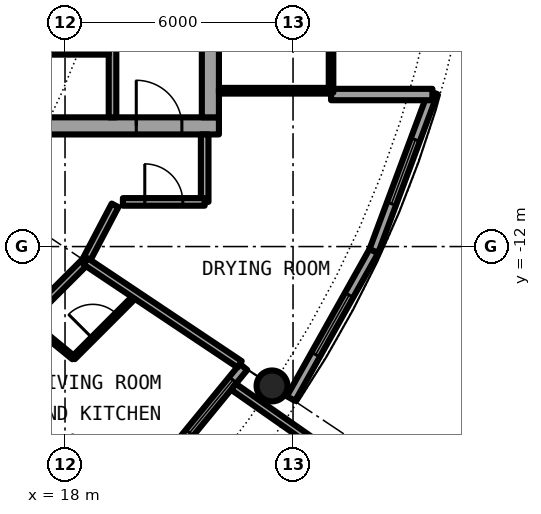
"""IFC4 building model, lengths in metres.
Left out: names, types, materials, properties, quantities, classifications, styles, units other than length and angle.
Written with IfcOpenShell. Run it as: python <this file> out.ifc"""

import sys

from ifc_helpers import new_model, si_unit, direction, frame, frame_2d, origin, origin_2d, place, context, subcontext, project, spatial, rectangle, hollow_circle, extrude, element, fill, save


model = new_model("IFC4")
c1 = context("Model", 3, precision=1e-05, world=origin(), true_north=direction((0.0, 1.0)))
c2 = subcontext(c1, "Body", "Model", "MODEL_VIEW")
j1 = project(units=[si_unit("LENGTHUNIT", "METRE"), si_unit("PLANEANGLEUNIT", "RADIAN")], contexts=[c1])
p1 = place(None, origin())
s1 = spatial("IfcSite", under=j1, at=p1, CompositionType="ELEMENT")
p2 = place(p1, origin())
s2 = spatial("IfcBuilding", under=s1, at=p2, CompositionType="ELEMENT")
p3 = place(p2, frame((0.0, 0.0, 218.8)))
s3 = spatial("IfcBuildingStorey", under=s2, at=p3, CompositionType="ELEMENT", Elevation=218.8)
p4 = place(p3, frame((23.448, -15.667, 0.0), z_axis=(0.0, 0.0, 1.0), x_axis=(1.0, 0.0, 0.0)))
e1 = element("IfcColumn", 1, at=p4, inside=s3, PredefinedType="COLUMN", context=c2, shape_type="SweptSolid", body=[
    extrude(hollow_circle(Radius=0.406, WallThickness=0.03, at=origin_2d()), origin(), (0.0, 0.0, 1.0), 3.05),
])
p5 = place(p3, frame((19.304, -19.304, 0.0), z_axis=(0.0, 0.0, 1.0), x_axis=(0.634382322723, 0.773019449054, 0.0)))
e2 = element("IfcWall", 2, at=p5, inside=s3, PredefinedType="SOLIDWALL", context=c2, shape_type="SweptSolid", body=[
    extrude(rectangle(XDim=5.352, YDim=0.25, at=frame_2d((2.676, 0.0))), origin(), (0.0, 0.0, 1.0), 2.65),
])
p6 = place(p5, frame((0.841, 0.0, 0.0)))
e3 = element("IfcOpeningElement", 3, at=p6, cuts=e2, PredefinedType="OPENING", context=c2, shape_type="SweptSolid", body=[
    extrude(rectangle(XDim=1.0, YDim=2.2, at=frame_2d((0.5, 1.1))), frame((0.0, 0.135, 0.0), z_axis=(0.0, -1.0, 0.0), x_axis=(1.0, 0.0, 0.0)), (0.0, 0.0, 1.0), 0.27),
])
p7 = place(p5, frame((3.111, 0.0, 0.3)))
e4 = element("IfcOpeningElement", 4, at=p7, cuts=e2, PredefinedType="OPENING", context=c2, shape_type="SweptSolid", body=[
    extrude(rectangle(XDim=1.8, YDim=2.1, at=frame_2d((0.9, 1.05))), frame((0.0, 0.135, 0.0), z_axis=(0.0, -1.0, 0.0), x_axis=(1.0, 0.0, 0.0)), (0.0, 0.0, 1.0), 0.27),
])
p8 = place(p3, frame((22.433, -15.688, -0.03), z_axis=(0.0, 0.0, 1.0), x_axis=(0.819373043115, -0.573260687834, 0.0)))
e5 = element("IfcWall", 5, at=p8, inside=s3, PredefinedType="SOLIDWALL", context=c2, shape_type="SweptSolid", body=[
    extrude(rectangle(XDim=2.925, YDim=0.2, at=frame_2d((1.463, 0.0))), origin(), (0.0, 0.0, 1.0), 2.68),
])
p9 = place(p3, frame((23.946, -16.0, 0.0), z_axis=(0.0, 0.0, 1.0), x_axis=(0.489696356642, 0.871893042919, 0.0)))
e6 = element("IfcWall", 6, at=p9, inside=s3, PredefinedType="SOLIDWALL", context=c2, shape_type="SweptSolid", body=[
    extrude(rectangle(XDim=4.454, YDim=0.25, at=frame_2d((2.227, 0.0))), origin(), (0.0, 0.0, 1.0), 2.65),
])
p10 = place(p9, frame((1.327, 0.0, 0.3)))
e7 = element("IfcOpeningElement", 7, at=p10, cuts=e6, PredefinedType="OPENING", context=c2, shape_type="SweptSolid", body=[
    extrude(rectangle(XDim=1.8, YDim=2.1, at=frame_2d((0.9, 1.05))), frame((0.0, 0.135, 0.0), z_axis=(0.0, -1.0, 0.0), x_axis=(1.0, 0.0, 0.0)), (0.0, 0.0, 1.0), 0.27),
])
p11 = place(p3, frame((26.127, -12.117, 0.0), z_axis=(0.0, 0.0, 1.0), x_axis=(0.349247811493, 0.937030397675, 0.0)))
e8 = element("IfcWall", 8, at=p11, inside=s3, PredefinedType="SOLIDWALL", context=c2, shape_type="SweptSolid", body=[
    extrude(rectangle(XDim=4.452, YDim=0.25, at=frame_2d((2.226, 0.0))), origin(), (0.0, 0.0, 1.0), 2.65),
])
p12 = place(p11, frame((1.327, 0.0, 0.3)))
e9 = element("IfcOpeningElement", 9, at=p12, cuts=e8, PredefinedType="OPENING", context=c2, shape_type="SweptSolid", body=[
    extrude(rectangle(XDim=1.8, YDim=2.1, at=frame_2d((0.9, 1.05))), frame((0.0, 0.135, 0.0), z_axis=(0.0, -1.0, 0.0), x_axis=(1.0, 0.0, 0.0)), (0.0, 0.0, 1.0), 0.27),
])
p13 = place(p3, frame((25.0, -8.0, 0.0), z_axis=(0.0, 0.0, 1.0), x_axis=(1.0, 0.0, 0.0)))
e10 = element("IfcWall", 10, at=p13, inside=s3, PredefinedType="SOLIDWALL", context=c2, shape_type="SweptSolid", body=[
    extrude(rectangle(XDim=2.667, YDim=0.3, at=frame_2d((1.333, 0.0))), origin(), (0.0, 0.0, 1.0), 2.65),
])
p14 = place(p3, frame((8.55, -8.825, 0.0), z_axis=(0.0, 0.0, 1.0), x_axis=(1.0, 0.0, 0.0)))
e11 = element("IfcWall", 11, at=p14, inside=s3, PredefinedType="SHEAR", context=c2, shape_type="SweptSolid", body=[
    extrude(rectangle(XDim=13.5, YDim=0.45, at=frame_2d((6.75, 0.0))), origin(), (0.0, 0.0, 1.0), 3.05),
])
p15 = place(p14, frame((11.325, 0.0, 0.0)))
e12 = element("IfcOpeningElement", 12, at=p15, cuts=e11, PredefinedType="OPENING", context=c2, shape_type="SweptSolid", body=[
    extrude(rectangle(XDim=1.2, YDim=2.3, at=frame_2d((0.6, 1.15))), frame((0.0, 0.235, 0.0), z_axis=(0.0, -1.0, 0.0), x_axis=(1.0, 0.0, 0.0)), (0.0, 0.0, 1.0), 0.47),
])
p16 = place(p3, frame((21.825, 8.6, 0.0), z_axis=(0.0, 0.0, 1.0), x_axis=(0.0, -1.0, 0.0)))
e13 = element("IfcWall", 13, at=p16, inside=s3, PredefinedType="SHEAR", context=c2, shape_type="SweptSolid", body=[
    extrude(rectangle(XDim=17.2, YDim=0.45, at=frame_2d((8.6, 0.0))), origin(), (0.0, 0.0, 1.0), 3.05),
])
p17 = place(p16, frame((7.7, 0.0, 0.0)))
e14 = element("IfcOpeningElement", 14, at=p17, cuts=e13, PredefinedType="OPENING", context=c2, shape_type="SweptSolid", body=[
    extrude(rectangle(XDim=1.8, YDim=2.3, at=frame_2d((0.9, 1.15))), frame((0.0, 0.235, 0.0), z_axis=(0.0, -1.0, 0.0), x_axis=(1.0, 0.0, 0.0)), (0.0, 0.0, 1.0), 0.47),
])
p18 = place(p3, frame((19.25, -8.6, 0.0), z_axis=(0.0, 0.0, 1.0), x_axis=(0.0, 1.0, 0.0)))
e15 = element("IfcWall", 15, at=p18, inside=s3, PredefinedType="SOLIDWALL", context=c2, shape_type="SweptSolid", body=[
    extrude(rectangle(XDim=7.025, YDim=0.2, at=frame_2d((3.513, 0.0))), origin(), (0.0, 0.0, 1.0), 2.65),
])
p19 = place(p18, frame((2.35, 0.0, 0.0)))
e16 = element("IfcOpeningElement", 16, at=p19, cuts=e15, PredefinedType="OPENING", context=c2, shape_type="SweptSolid", body=[
    extrude(rectangle(XDim=1.1, YDim=2.3, at=frame_2d((0.55, 1.15))), frame((0.0, 0.11, 0.0), z_axis=(0.0, -1.0, 0.0), x_axis=(1.0, 0.0, 0.0)), (0.0, 0.0, 1.0), 0.22),
])
p20 = place(p3, frame((15.45, -6.875, 0.0), z_axis=(0.0, 0.0, 1.0), x_axis=(1.0, 0.0, 0.0)))
e17 = element("IfcWall", 17, at=p20, inside=s3, PredefinedType="PARTITIONING", context=c2, shape_type="SweptSolid", body=[
    extrude(rectangle(XDim=3.7, YDim=0.15, at=frame_2d((1.85, 0.0))), origin(), (0.0, 0.0, 1.0), 2.65),
])
p21 = place(p20, frame((1.4, 0.0, 0.0)))
e18 = element("IfcOpeningElement", 18, at=p21, cuts=e17, PredefinedType="OPENING", context=c2, shape_type="SweptSolid", body=[
    extrude(rectangle(XDim=0.9, YDim=2.3, at=frame_2d((0.45, 1.15))), frame((0.0, 0.085, 0.0), z_axis=(0.0, -1.0, 0.0), x_axis=(1.0, 0.0, 0.0)), (0.0, 0.0, 1.0), 0.17),
])
p22 = place(p3, frame((22.05, -7.9, 0.0), z_axis=(0.0, 0.0, 1.0), x_axis=(1.0, 0.0, 0.0)))
e19 = element("IfcWall", 19, at=p22, inside=s3, PredefinedType="PARTITIONING", context=c2, shape_type="SweptSolid", body=[
    extrude(rectangle(XDim=2.89, YDim=0.15, at=frame_2d((1.445, 0.0))), origin(), (0.0, 0.0, 1.0), 2.65),
])
p23 = place(p3, frame((25.0, -7.95, 0.0), z_axis=(0.0, 0.0, 1.0), x_axis=(0.0, 1.0, 0.0)))
e20 = element("IfcWall", 20, at=p23, inside=s3, PredefinedType="PARTITIONING", context=c2, shape_type="SweptSolid", body=[
    extrude(rectangle(XDim=15.9, YDim=0.12, at=frame_2d((7.95, 0.0))), origin(), (0.0, 0.0, 1.0), 2.65),
])
p24 = place(p23, frame((0.95, 0.0, 0.1)))
e21 = element("IfcOpeningElement", 21, at=p24, cuts=e20, PredefinedType="OPENING", context=c2, shape_type="SweptSolid", body=[
    extrude(rectangle(XDim=14.0, YDim=1.85, at=frame_2d((7.0, 0.925))), frame((0.0, 0.07, 0.0), z_axis=(0.0, -1.0, 0.0), x_axis=(1.0, 0.0, 0.0)), (0.0, 0.0, 1.0), 0.14),
])
p25 = place(p3, frame((18.224, -14.927, 0.0), z_axis=(0.0, 0.0, 1.0), x_axis=(0.706897299114, 0.707316201218, 0.0)))
e22 = element("IfcWall", 22, at=p25, inside=s3, PredefinedType="PARTITIONING", context=c2, shape_type="SweptSolid", body=[
    extrude(rectangle(XDim=2.331, YDim=0.1, at=frame_2d((1.166, 0.0))), origin(), (0.0, 0.0, 1.0), 2.65),
])
p26 = place(p25, frame((0.716, 0.0, 0.0)))
e23 = element("IfcOpeningElement", 23, at=p26, cuts=e22, PredefinedType="OPENING", context=c2, shape_type="SweptSolid", body=[
    extrude(rectangle(XDim=0.9, YDim=2.3, at=frame_2d((0.45, 1.15))), frame((0.0, 0.06, 0.0), z_axis=(0.0, -1.0, 0.0), x_axis=(1.0, 0.0, 0.0)), (0.0, 0.0, 1.0), 0.12),
])
p27 = place(p3, frame((18.542, -12.389, 0.0), z_axis=(0.0, 0.0, 1.0), x_axis=(0.465359652486, 0.885121683068, 0.0)))
e24 = element("IfcWall", 24, at=p27, inside=s3, PredefinedType="PARTITIONING", context=c2, shape_type="SweptSolid", body=[
    extrude(rectangle(XDim=1.665, YDim=0.2, at=frame_2d((0.833, 0.0))), origin(), (0.0, 0.0, 1.0), 2.65),
])
p28 = place(p3, frame((12.389, -18.542, 0.0), z_axis=(0.0, 0.0, 1.0), x_axis=(0.707106781187, 0.707106781187, 0.0)))
e25 = element("IfcWall", 25, at=p28, inside=s3, PredefinedType="PARTITIONING", context=c2, shape_type="SweptSolid", body=[
    extrude(rectangle(XDim=8.702, YDim=0.2, at=frame_2d((4.351, 0.0))), origin(), (0.0, 0.0, 1.0), 2.65),
])
p29 = place(p28, frame((2.763, 0.0, 0.0)))
e26 = element("IfcOpeningElement", 26, at=p29, cuts=e25, PredefinedType="OPENING", context=c2, shape_type="SweptSolid", body=[
    extrude(rectangle(XDim=1.0, YDim=2.3, at=frame_2d((0.5, 1.15))), frame((0.0, 0.11, 0.0), z_axis=(0.0, -1.0, 0.0), x_axis=(1.0, 0.0, 0.0)), (0.0, 0.0, 1.0), 0.22),
])
p30 = place(p3, frame((21.675, -10.825, 0.0), z_axis=(0.0, 0.0, 1.0), x_axis=(0.0, 1.0, 0.0)))
e27 = element("IfcWall", 27, at=p30, inside=s3, PredefinedType="PARTITIONING", context=c2, shape_type="SweptSolid", body=[
    extrude(rectangle(XDim=1.775, YDim=0.2, at=frame_2d((0.887, 0.0))), origin(), (0.0, 0.0, 1.0), 2.65),
])
p31 = place(p3, frame((19.523, -10.825, 0.0), z_axis=(0.0, 0.0, 1.0), x_axis=(1.0, 0.0, 0.0)))
e28 = element("IfcWall", 28, at=p31, inside=s3, PredefinedType="PARTITIONING", context=c2, shape_type="SweptSolid", body=[
    extrude(rectangle(XDim=2.152, YDim=0.2, at=frame_2d((1.076, 0.0))), origin(), (0.0, 0.0, 1.0), 2.65),
])
p32 = place(p31, frame((0.576, 0.0, 0.0)))
e29 = element("IfcOpeningElement", 29, at=p32, cuts=e28, PredefinedType="OPENING", context=c2, shape_type="SweptSolid", body=[
    extrude(rectangle(XDim=1.0, YDim=2.3, at=frame_2d((0.5, 1.15))), frame((0.0, 0.11, 0.0), z_axis=(0.0, -1.0, 0.0), x_axis=(1.0, 0.0, 0.0)), (0.0, 0.0, 1.0), 0.22),
])
p33 = place(p3, frame((16.575, -16.575, 0.0), z_axis=(0.0, 0.0, 1.0), x_axis=(0.707106781187, -0.707106781187, 0.0)))
e30 = element("IfcWall", 30, at=p33, inside=s3, PredefinedType="PARTITIONING", context=c2, shape_type="SweptSolid", body=[
    extrude(rectangle(XDim=3.735, YDim=0.1, at=frame_2d((1.868, 0.0))), origin(), (0.0, 0.0, 1.0), 2.65),
])
p34 = place(p33, frame((1.417, 0.0, 0.0)))
e31 = element("IfcOpeningElement", 31, at=p34, cuts=e30, PredefinedType="OPENING", context=c2, shape_type="SweptSolid", body=[
    extrude(rectangle(XDim=0.9, YDim=2.3, at=frame_2d((0.45, 1.15))), frame((0.0, 0.06, 0.0), z_axis=(0.0, -1.0, 0.0), x_axis=(1.0, 0.0, 0.0)), (0.0, 0.0, 1.0), 0.12),
])
p35 = place(p3, frame((18.542, -12.389, 0.0), z_axis=(0.0, 0.0, 1.0), x_axis=(0.831387096605, -0.55569370664, 0.0)))
e32 = element("IfcWall", 32, at=p35, inside=s3, PredefinedType="PARTITIONING", context=c2, shape_type="SweptSolid", body=[
    extrude(rectangle(XDim=4.875, YDim=0.2, at=frame_2d((2.438, 0.0))), origin(), (0.0, 0.0, 1.0), 2.65),
])
p36 = place(p3, frame((17.004, -13.927, 0.0), z_axis=(0.0, 0.0, 1.0), x_axis=(0.773446828454, -0.633861186344, 0.0)))
e33 = element("IfcWall", 33, at=p36, inside=s3, PredefinedType="PARTITIONING", context=c2, shape_type="SweptSolid", body=[
    extrude(rectangle(XDim=1.578, YDim=0.1, at=frame_2d((0.789, 0.0))), origin(), (0.0, 0.0, 1.0), 2.65),
])
p37 = place(p7, origin())
e34 = element("IfcWindow", 34, at=p37, inside=s3, PartitioningType="SINGLE_PANEL", PredefinedType="WINDOW", context=c2, shape_type="SweptSolid", body=[
    extrude(rectangle(XDim=1.8, YDim=2.1, at=frame_2d((0.9, 1.05))), frame((0.0, 0.03, 0.0), z_axis=(0.0, -1.0, 0.0), x_axis=(1.0, 0.0, 0.0)), (0.0, 0.0, 1.0), 0.06),
])
fill(e4, e34)
p38 = place(p10, origin())
e35 = element("IfcWindow", 35, at=p38, inside=s3, PartitioningType="SINGLE_PANEL", PredefinedType="WINDOW", context=c2, shape_type="SweptSolid", body=[
    extrude(rectangle(XDim=1.8, YDim=2.1, at=frame_2d((0.9, 1.05))), frame((0.0, 0.03, 0.0), z_axis=(0.0, -1.0, 0.0), x_axis=(1.0, 0.0, 0.0)), (0.0, 0.0, 1.0), 0.06),
])
fill(e7, e35)
p39 = place(p12, origin())
e36 = element("IfcWindow", 36, at=p39, inside=s3, PartitioningType="SINGLE_PANEL", PredefinedType="WINDOW", context=c2, shape_type="SweptSolid", body=[
    extrude(rectangle(XDim=1.8, YDim=2.1, at=frame_2d((0.9, 1.05))), frame((0.0, 0.03, 0.0), z_axis=(0.0, -1.0, 0.0), x_axis=(1.0, 0.0, 0.0)), (0.0, 0.0, 1.0), 0.06),
])
fill(e9, e36)
p40 = place(p21, origin())
e37 = element("IfcDoor", 37, at=p40, inside=s3, OperationType="SINGLE_SWING_LEFT", PredefinedType="DOOR", context=c2, shape_type="SweptSolid", body=[
    extrude(rectangle(XDim=0.9, YDim=2.3, at=frame_2d((0.45, 1.15))), frame((0.0, 0.025, 0.0), z_axis=(0.0, -1.0, 0.0), x_axis=(1.0, 0.0, 0.0)), (0.0, 0.0, 1.0), 0.05),
])
fill(e18, e37)
p41 = place(p15, origin())
e38 = element("IfcDoor", 38, at=p41, inside=s3, OperationType="SINGLE_SWING_LEFT", PredefinedType="DOOR", context=c2, shape_type="SweptSolid", body=[
    extrude(rectangle(XDim=1.2, YDim=2.3, at=frame_2d((0.6, 1.15))), frame((0.0, 0.025, 0.0), z_axis=(0.0, -1.0, 0.0), x_axis=(1.0, 0.0, 0.0)), (0.0, 0.0, 1.0), 0.05),
])
fill(e12, e38)
p42 = place(p24, origin())
e39 = element("IfcWindow", 39, at=p42, inside=s3, PartitioningType="SINGLE_PANEL", PredefinedType="WINDOW", context=c2, shape_type="SweptSolid", body=[
    extrude(rectangle(XDim=14.0, YDim=1.85, at=frame_2d((7.0, 0.925))), frame((0.0, 0.03, 0.0), z_axis=(0.0, -1.0, 0.0), x_axis=(1.0, 0.0, 0.0)), (0.0, 0.0, 1.0), 0.06),
])
fill(e21, e39)
p43 = place(p26, origin())
e40 = element("IfcDoor", 40, at=p43, inside=s3, OperationType="SINGLE_SWING_RIGHT", PredefinedType="DOOR", context=c2, shape_type="SweptSolid", body=[
    extrude(rectangle(XDim=0.9, YDim=2.3, at=frame_2d((0.45, 1.15))), frame((0.0, 0.025, 0.0), z_axis=(0.0, -1.0, 0.0), x_axis=(1.0, 0.0, 0.0)), (0.0, 0.0, 1.0), 0.05),
])
fill(e23, e40)
p44 = place(p32, origin())
e41 = element("IfcDoor", 41, at=p44, inside=s3, OperationType="SINGLE_SWING_LEFT", PredefinedType="DOOR", context=c2, shape_type="SweptSolid", body=[
    extrude(rectangle(XDim=1.0, YDim=2.3, at=frame_2d((0.5, 1.15))), frame((0.0, 0.025, 0.0), z_axis=(0.0, -1.0, 0.0), x_axis=(1.0, 0.0, 0.0)), (0.0, 0.0, 1.0), 0.05),
])
fill(e29, e41)
save(model, sys.argv[1])
